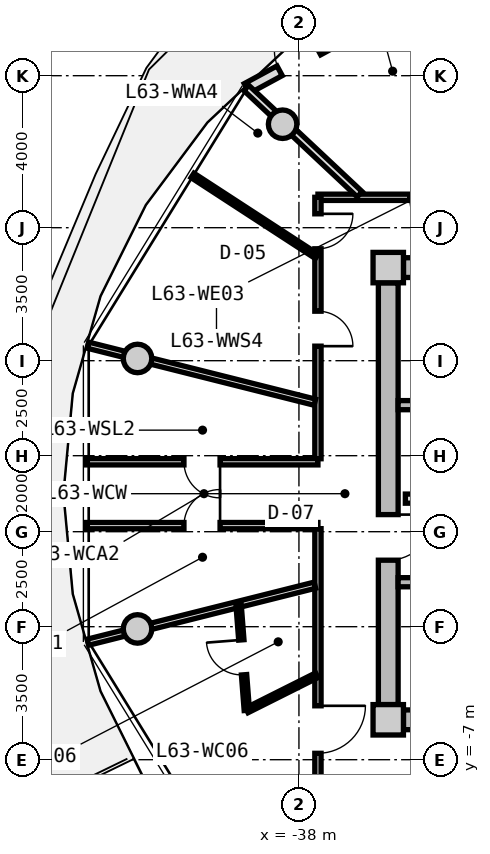
"""IFC4 building model, lengths in metres.
Left out: names, types, materials, properties, quantities, classifications, styles, units other than length and angle.
Written with IfcOpenShell. Run it as: python <this file> out.ifc"""

import sys

from ifc_helpers import new_model, si_unit, direction, frame, frame_2d, origin, origin_2d, place, context, subcontext, project, spatial, rectangle, circle, extrude, source, transform, mapped, element, fill, save


model = new_model("IFC4")
c1 = context("Model", 3, precision=1e-05, world=origin(), true_north=direction((0.0, 1.0)))
c2 = subcontext(c1, "Body", "Model", "MODEL_VIEW")
j1 = project(units=[si_unit("LENGTHUNIT", "METRE"), si_unit("PLANEANGLEUNIT", "RADIAN")], contexts=[c1])
p1 = place(None, origin())
s1 = spatial("IfcSite", under=j1, at=p1, CompositionType="ELEMENT")
p2 = place(p1, origin())
s2 = spatial("IfcBuilding", under=s1, at=p2, CompositionType="ELEMENT")
p3 = place(p2, frame((0.0, 0.0, 203.8)))
s3 = spatial("IfcBuildingStorey", under=s2, at=p3, CompositionType="ELEMENT", Elevation=203.8)
m1 = source(origin(), c2, "Body", "SweptSolid", [
    extrude(rectangle(XDim=0.8, YDim=0.8, at=origin_2d()), origin(), (0.0, 0.0, 1.0), 4.0),
])
for number, where, z_axis, x_axis in (
    (1, (-35.65, -5.95, 0.0), (0.0, 0.0, 1.0), (1.0, 0.0, 0.0)),
    (2, (-35.65, 5.95, 0.0), (0.0, 0.0, 1.0), (1.0, 0.0, 0.0)),
):
    element("IfcColumn", number, at=place(p3, frame(where, z_axis=z_axis, x_axis=x_axis)), inside=s3, PredefinedType="COLUMN", context=c2, shape_type="MappedRepresentation", body=[
        mapped(m1, transform((0.0, 0.0, 0.0), x_axis=(1.0, 0.0, 0.0), y_axis=(0.0, 1.0, 0.0), z_axis=(0.0, 0.0, 1.0), scale=1.0)),
    ])
m2 = source(origin(), c2, "Body", "SweptSolid", [
    extrude(rectangle(XDim=14.5, YDim=0.52, at=frame_2d((7.25, 0.0))), origin(), (0.0, 0.0, 1.0), 3.71),
])
for number, where, z_axis, x_axis in (
    (3, (-35.25, 5.95, 0.0), (0.0, 0.0, 1.0), (1.0, 0.0, 0.0)),
    (4, (-20.75, -5.95, 0.0), (0.0, 0.0, 1.0), (-1.0, 0.0, 0.0)),
):
    element("IfcWall", number, at=place(p3, frame(where, z_axis=z_axis, x_axis=x_axis)), inside=s3, PredefinedType="SHEAR", context=c2, shape_type="MappedRepresentation", body=[
        mapped(m2, transform((0.0, 0.0, 0.0), x_axis=(1.0, 0.0, 0.0), y_axis=(0.0, 1.0, 0.0), z_axis=(0.0, 0.0, 1.0), scale=1.0)),
    ])
m3 = source(origin(), c2, "Body", "SweptSolid", [
    extrude(rectangle(XDim=11.1, YDim=0.52, at=frame_2d((5.55, 0.0))), origin(), (0.0, 0.0, 1.0), 3.71),
])
p4 = place(p3, frame((-35.65, -5.55, 0.0), z_axis=(0.0, 0.0, 1.0), x_axis=(0.0, 1.0, 0.0)))
e5 = element("IfcWall", 5, at=p4, inside=s3, PredefinedType="SHEAR", context=c2, shape_type="MappedRepresentation", body=[
    mapped(m3, transform((0.0, 0.0, 0.0), x_axis=(1.0, 0.0, 0.0), y_axis=(0.0, 1.0, 0.0), z_axis=(0.0, 0.0, 1.0), scale=1.0)),
])
p5 = place(p4, frame((3.8, 0.0, 0.0)))
e6 = element("IfcOpeningElement", 6, at=p5, cuts=e5, PredefinedType="OPENING", context=c2, shape_type="SweptSolid", body=[
    extrude(rectangle(XDim=1.2, YDim=2.15, at=frame_2d((0.6, 1.075))), frame((0.0, 0.27, 0.0), z_axis=(0.0, -1.0, 0.0), x_axis=(1.0, 0.0, 0.0)), (0.0, 0.0, 1.0), 0.54),
])
m4 = source(origin(), c2, "Body", "SweptSolid", [
    extrude(circle(Radius=0.375, at=origin_2d()), origin(), (0.0, 0.0, 1.0), 4.0),
])
for number, where, z_axis, x_axis in (
    (7, (-38.43, 9.723, 0.0), (0.0, 0.0, 1.0), (1.0, 0.0, 0.0)),
    (8, (-42.247, 3.559, 0.0), (0.0, 0.0, 1.0), (1.0, 0.0, 0.0)),
    (9, (-42.247, -3.559, 0.0), (0.0, 0.0, 1.0), (1.0, 0.0, 0.0)),
):
    element("IfcColumn", number, at=place(p3, frame(where, z_axis=z_axis, x_axis=x_axis)), inside=s3, PredefinedType="COLUMN", context=c2, shape_type="MappedRepresentation", body=[
        mapped(m4, transform((0.0, 0.0, 0.0), x_axis=(1.0, 0.0, 0.0), y_axis=(0.0, 1.0, 0.0), z_axis=(0.0, 0.0, 1.0), scale=1.0)),
    ])
m5 = source(origin(), c2, "Body", "SweptSolid", [
    extrude(rectangle(XDim=8.197, YDim=0.29, at=frame_2d((4.099, 0.0))), origin(), (0.0, 0.0, 1.0), 3.71),
])
p6 = place(p3, frame((-39.37, 10.663, 0.0), z_axis=(0.0, 0.0, 1.0), x_axis=(0.879369910001, 0.476139224791, 0.0)))
e10 = element("IfcWall", 10, at=p6, inside=s3, PredefinedType="SOLIDWALL", context=c2, shape_type="MappedRepresentation", body=[
    mapped(m5, transform((0.0, 0.0, 0.0), x_axis=(1.0, 0.0, 0.0), y_axis=(0.0, 1.0, 0.0), z_axis=(0.0, 0.0, 1.0), scale=1.0)),
])
p7 = place(p6, frame((0.98, 0.0, 0.0)))
e11 = element("IfcOpeningElement", 11, at=p7, cuts=e10, PredefinedType="OPENING", context=c2, shape_type="SweptSolid", body=[
    extrude(rectangle(XDim=1.15, YDim=2.25, at=frame_2d((0.575, 1.125))), frame((0.0, 0.155, 0.0), z_axis=(0.0, -1.0, 0.0), x_axis=(1.0, 0.0, 0.0)), (0.0, 0.0, 1.0), 0.31),
])
p8 = place(p6, frame((4.448, 0.0, 0.85)))
e12 = element("IfcOpeningElement", 12, at=p8, cuts=e10, PredefinedType="OPENING", context=c2, shape_type="SweptSolid", body=[
    extrude(rectangle(XDim=1.2, YDim=1.5, at=frame_2d((0.6, 0.75))), frame((0.0, 0.155, 0.0), z_axis=(0.0, -1.0, 0.0), x_axis=(1.0, 0.0, 0.0)), (0.0, 0.0, 1.0), 0.31),
])
m6 = source(origin(), c2, "Body", "SweptSolid", [
    extrude(rectangle(XDim=7.93, YDim=0.24, at=frame_2d((3.965, 0.0))), origin(), (0.0, 0.0, 1.0), 3.71),
])
p9 = place(p3, frame((-35.39, 2.33, 0.0), z_axis=(0.0, 0.0, 1.0), x_axis=(1.0, 0.0, 0.0)))
e13 = element("IfcWall", 13, at=p9, inside=s3, PredefinedType="PARTITIONING", context=c2, shape_type="MappedRepresentation", body=[
    mapped(m6, transform((0.0, 0.0, 0.0), x_axis=(1.0, 0.0, 0.0), y_axis=(0.0, 1.0, 0.0), z_axis=(0.0, 0.0, 1.0), scale=1.0)),
])
p10 = place(p3, frame((-35.39, -2.33, 0.0), z_axis=(0.0, 0.0, 1.0), x_axis=(1.0, 0.0, 0.0)))
e14 = element("IfcWall", 14, at=p10, inside=s3, PredefinedType="PARTITIONING", context=c2, shape_type="MappedRepresentation", body=[
    mapped(m6, transform((0.0, 0.0, 0.0), x_axis=(1.0, 0.0, 0.0), y_axis=(0.0, 1.0, 0.0), z_axis=(0.0, 0.0, 1.0), scale=1.0)),
])
p11 = place(p10, frame((1.05, 0.0, 0.0)))
e15 = element("IfcOpeningElement", 15, at=p11, cuts=e14, PredefinedType="OPENING", context=c2, shape_type="SweptSolid", body=[
    extrude(rectangle(XDim=1.1, YDim=2.15, at=frame_2d((0.55, 1.075))), frame((0.0, 0.13, 0.0), z_axis=(0.0, -1.0, 0.0), x_axis=(1.0, 0.0, 0.0)), (0.0, 0.0, 1.0), 0.26),
])
m7 = source(origin(), c2, "Body", "SweptSolid", [
    extrude(rectangle(XDim=7.62, YDim=0.24, at=frame_2d((3.81, 0.0))), origin(), (0.0, 0.0, 1.0), 3.695),
])
p12 = place(p3, frame((-35.2, -0.13, 0.0), z_axis=(0.0, 0.0, 1.0), x_axis=(1.0, 0.0, 0.0)))
e16 = element("IfcWall", 16, at=p12, inside=s3, PredefinedType="PARTITIONING", context=c2, shape_type="MappedRepresentation", body=[
    mapped(m7, transform((0.0, 0.0, 0.0), x_axis=(1.0, 0.0, 0.0), y_axis=(0.0, 1.0, 0.0), z_axis=(0.0, 0.0, 1.0), scale=1.0)),
])
p13 = place(p12, frame((6.22, 0.0, 0.0)))
e17 = element("IfcOpeningElement", 17, at=p13, cuts=e16, PredefinedType="OPENING", context=c2, shape_type="SweptSolid", body=[
    extrude(rectangle(XDim=1.0, YDim=2.1, at=frame_2d((0.5, 1.05))), frame((0.0, 0.13, 0.0), z_axis=(0.0, -1.0, 0.0), x_axis=(1.0, 0.0, 0.0)), (0.0, 0.0, 1.0), 0.26),
])
p14 = place(p12, frame((2.4, 0.0, 0.0)))
e18 = element("IfcOpeningElement", 18, at=p14, cuts=e16, PredefinedType="OPENING", context=c2, shape_type="SweptSolid", body=[
    extrude(rectangle(XDim=1.0, YDim=2.1, at=frame_2d((0.5, 1.05))), frame((0.0, 0.13, 0.0), z_axis=(0.0, -1.0, 0.0), x_axis=(1.0, 0.0, 0.0)), (0.0, 0.0, 1.0), 0.26),
])
m8 = source(origin(), c2, "Body", "SweptSolid", [
    extrude(rectangle(XDim=8.58, YDim=0.165, at=frame_2d((4.29, 0.0))), origin(), (0.0, 0.0, 1.0), 3.695),
])
p15 = place(p3, frame((-37.5, 7.8, 0.0), z_axis=(0.0, 0.0, 1.0), x_axis=(1.0, 0.0, 0.0)))
e19 = element("IfcWall", 19, at=p15, inside=s3, PredefinedType="PARTITIONING", context=c2, shape_type="MappedRepresentation", body=[
    mapped(m8, transform((0.0, 0.0, 0.0), x_axis=(1.0, 0.0, 0.0), y_axis=(0.0, 1.0, 0.0), z_axis=(0.0, 0.0, 1.0), scale=1.0)),
])
p16 = place(p15, frame((2.415, 0.0, 0.0)))
e20 = element("IfcOpeningElement", 20, at=p16, cuts=e19, PredefinedType="OPENING", context=c2, shape_type="SweptSolid", body=[
    extrude(rectangle(XDim=1.25, YDim=2.2, at=frame_2d((0.625, 1.1))), frame((0.0, 0.093, 0.0), z_axis=(0.0, -1.0, 0.0), x_axis=(1.0, 0.0, 0.0)), (0.0, 0.0, 1.0), 0.185),
])
m9 = source(origin(), c2, "Body", "SweptSolid", [
    extrude(rectangle(XDim=6.88, YDim=0.165, at=frame_2d((3.44, 0.0))), origin(), (0.0, 0.0, 1.0), 3.695),
])
p17 = place(p3, frame((-37.5, -7.8, 0.0), z_axis=(0.0, 0.0, 1.0), x_axis=(0.0, 1.0, 0.0)))
e21 = element("IfcWall", 21, at=p17, inside=s3, PredefinedType="PARTITIONING", context=c2, shape_type="MappedRepresentation", body=[
    mapped(m9, transform((0.0, 0.0, 0.0), x_axis=(1.0, 0.0, 0.0), y_axis=(0.0, 1.0, 0.0), z_axis=(0.0, 0.0, 1.0), scale=1.0)),
])
p18 = place(p17, frame((0.968, 0.0, 0.0)))
e22 = element("IfcOpeningElement", 22, at=p18, cuts=e21, PredefinedType="OPENING", context=c2, shape_type="SweptSolid", body=[
    extrude(rectangle(XDim=1.25, YDim=2.2, at=frame_2d((0.625, 1.1))), frame((0.0, 0.093, 0.0), z_axis=(0.0, -1.0, 0.0), x_axis=(1.0, 0.0, 0.0)), (0.0, 0.0, 1.0), 0.185),
])
p19 = place(p3, frame((-37.5, 0.92, 0.0), z_axis=(0.0, 0.0, 1.0), x_axis=(0.0, 1.0, 0.0)))
e23 = element("IfcWall", 23, at=p19, inside=s3, PredefinedType="PARTITIONING", context=c2, shape_type="MappedRepresentation", body=[
    mapped(m9, transform((0.0, 0.0, 0.0), x_axis=(1.0, 0.0, 0.0), y_axis=(0.0, 1.0, 0.0), z_axis=(0.0, 0.0, 1.0), scale=1.0)),
])
p20 = place(p19, frame((5.525, 0.0, 0.0)))
e24 = element("IfcOpeningElement", 24, at=p20, cuts=e23, PredefinedType="OPENING", context=c2, shape_type="SweptSolid", body=[
    extrude(rectangle(XDim=0.92, YDim=2.1, at=frame_2d((0.46, 1.05))), frame((0.0, 0.093, 0.0), z_axis=(0.0, -1.0, 0.0), x_axis=(1.0, 0.0, 0.0)), (0.0, 0.0, 1.0), 0.185),
])
p21 = place(p19, frame((2.962, 0.0, 0.0)))
e25 = element("IfcOpeningElement", 25, at=p21, cuts=e23, PredefinedType="OPENING", context=c2, shape_type="SweptSolid", body=[
    extrude(rectangle(XDim=0.92, YDim=2.1, at=frame_2d((0.46, 1.05))), frame((0.0, 0.093, 0.0), z_axis=(0.0, -1.0, 0.0), x_axis=(1.0, 0.0, 0.0)), (0.0, 0.0, 1.0), 0.185),
])
m10 = source(origin(), c2, "Body", "SweptSolid", [
    extrude(rectangle(XDim=6.157, YDim=0.165, at=frame_2d((3.079, 0.0))), origin(), (0.0, 0.0, 1.0), 3.295),
])
for number, where, z_axis, x_axis in (
    (26, (-37.58, 2.407, 0.0), (0.0, 0.0, 1.0), (-0.97, 0.244, 0.0)),
    (27, (-37.58, -2.407, 0.0), (0.0, 0.0, 1.0), (-0.97, -0.244, 0.0)),
):
    element("IfcWall", number, at=place(p3, frame(where, z_axis=z_axis, x_axis=x_axis)), inside=s3, PredefinedType="PARTITIONING", context=c2, shape_type="MappedRepresentation", body=[
        mapped(m10, transform((0.0, 0.0, 0.0), x_axis=(1.0, 0.0, 0.0), y_axis=(0.0, 1.0, 0.0), z_axis=(0.0, 0.0, 1.0), scale=1.0)),
    ])
m11 = source(origin(), c2, "Body", "SweptSolid", [
    extrude(rectangle(XDim=6.101, YDim=0.165, at=frame_2d((3.051, 0.0))), origin(), (0.0, 0.0, 1.0), 3.695),
])
p22 = place(p3, frame((-43.601, 0.84, 0.0), z_axis=(0.0, 0.0, 1.0), x_axis=(1.0, 0.0, 0.0)))
e28 = element("IfcWall", 28, at=p22, inside=s3, PredefinedType="PARTITIONING", context=c2, shape_type="MappedRepresentation", body=[
    mapped(m11, transform((0.0, 0.0, 0.0), x_axis=(1.0, 0.0, 0.0), y_axis=(0.0, 1.0, 0.0), z_axis=(0.0, 0.0, 1.0), scale=1.0)),
])
p23 = place(p22, frame((2.576, 0.0, 0.0)))
e29 = element("IfcOpeningElement", 29, at=p23, cuts=e28, PredefinedType="OPENING", context=c2, shape_type="SweptSolid", body=[
    extrude(rectangle(XDim=0.95, YDim=2.1, at=frame_2d((0.475, 1.05))), frame((0.0, 0.093, 0.0), z_axis=(0.0, -1.0, 0.0), x_axis=(1.0, 0.0, 0.0)), (0.0, 0.0, 1.0), 0.185),
])
p24 = place(p3, frame((-37.5, -0.84, 0.0), z_axis=(0.0, 0.0, 1.0), x_axis=(-1.0, 0.0, 0.0)))
e30 = element("IfcWall", 30, at=p24, inside=s3, PredefinedType="PARTITIONING", context=c2, shape_type="MappedRepresentation", body=[
    mapped(m11, transform((0.0, 0.0, 0.0), x_axis=(1.0, 0.0, 0.0), y_axis=(0.0, 1.0, 0.0), z_axis=(0.0, 0.0, 1.0), scale=1.0)),
])
p25 = place(p24, frame((2.576, 0.0, 0.0)))
e31 = element("IfcOpeningElement", 31, at=p25, cuts=e30, PredefinedType="OPENING", context=c2, shape_type="SweptSolid", body=[
    extrude(rectangle(XDim=0.95, YDim=2.1, at=frame_2d((0.475, 1.05))), frame((0.0, 0.093, 0.0), z_axis=(0.0, -1.0, 0.0), x_axis=(1.0, 0.0, 0.0)), (0.0, 0.0, 1.0), 0.185),
])
m12 = source(origin(), c2, "Body", "SweptSolid", [
    extrude(rectangle(XDim=4.089, YDim=0.19, at=frame_2d((2.044, 0.0))), origin(), (0.0, 0.0, 1.0), 3.295),
])
p26 = place(p3, frame((-36.402, 7.88, 0.0), z_axis=(0.0, 0.0, 1.0), x_axis=(-0.729401273609, 0.684086092577, 0.0)))
e32 = element("IfcWall", 32, at=p26, inside=s3, PredefinedType="PARTITIONING", context=c2, shape_type="MappedRepresentation", body=[
    mapped(m12, transform((0.0, 0.0, 0.0), x_axis=(1.0, 0.0, 0.0), y_axis=(0.0, 1.0, 0.0), z_axis=(0.0, 0.0, 1.0), scale=1.0)),
])
m13 = source(origin(), c2, "Body", "SweptSolid", [
    extrude(rectangle(XDim=3.904, YDim=0.14, at=frame_2d((1.952, 0.0))), origin(), (0.0, 0.0, 1.0), 3.695),
])
p27 = place(p3, frame((-37.53, 6.246, 0.0), z_axis=(0.0, 0.0, 1.0), x_axis=(-0.838024687996, 0.545632314209, 0.0)))
e33 = element("IfcWall", 33, at=p27, inside=s3, PredefinedType="PARTITIONING", context=c2, shape_type="MappedRepresentation", body=[
    mapped(m13, transform((0.0, 0.0, 0.0), x_axis=(1.0, 0.0, 0.0), y_axis=(0.0, 1.0, 0.0), z_axis=(0.0, 0.0, 1.0), scale=1.0)),
])
m14 = source(origin(), c2, "Body", "SweptSolid", [
    extrude(rectangle(XDim=2.06, YDim=0.14, at=frame_2d((1.03, 0.0))), origin(), (0.0, 0.0, 1.0), 3.695),
])
p28 = place(p3, frame((-37.53, -4.778, 0.0), z_axis=(0.0, 0.0, 1.0), x_axis=(-0.893952568722, -0.448161583444, 0.0)))
e34 = element("IfcWall", 34, at=p28, inside=s3, PredefinedType="PARTITIONING", context=c2, shape_type="MappedRepresentation", body=[
    mapped(m14, transform((0.0, 0.0, 0.0), x_axis=(1.0, 0.0, 0.0), y_axis=(0.0, 1.0, 0.0), z_axis=(0.0, 0.0, 1.0), scale=1.0)),
])
m15 = source(origin(), c2, "Body", "SweptSolid", [
    extrude(rectangle(XDim=2.798, YDim=0.14, at=frame_2d((1.399, 0.0))), origin(), (0.0, 0.0, 1.0), 3.695),
])
p29 = place(p3, frame((-39.371, -5.701, 0.0), z_axis=(0.0, 0.0, 1.0), x_axis=(-0.077823984089, 0.996967114553, 0.0)))
e35 = element("IfcWall", 35, at=p29, inside=s3, PredefinedType="PARTITIONING", context=c2, shape_type="MappedRepresentation", body=[
    mapped(m15, transform((0.0, 0.0, 0.0), x_axis=(1.0, 0.0, 0.0), y_axis=(0.0, 1.0, 0.0), z_axis=(0.0, 0.0, 1.0), scale=1.0)),
])
p30 = place(p29, frame((0.939, 0.0, 0.0)))
e36 = element("IfcOpeningElement", 36, at=p30, cuts=e35, PredefinedType="OPENING", context=c2, shape_type="SweptSolid", body=[
    extrude(rectangle(XDim=0.92, YDim=2.1, at=frame_2d((0.46, 1.05))), frame((0.0, 0.08, 0.0), z_axis=(0.0, -1.0, 0.0), x_axis=(1.0, 0.0, 0.0)), (0.0, 0.0, 1.0), 0.16),
])
m16 = source(origin(), c2, "Body", "SweptSolid", [
    extrude(rectangle(XDim=1.15, YDim=2.25, at=frame_2d((0.575, 1.125))), frame((0.0, 0.025, 0.0), z_axis=(0.0, -1.0, 0.0), x_axis=(1.0, 0.0, 0.0)), (0.0, 0.0, 1.0), 0.05),
])
p31 = place(p7, origin())
e37 = element("IfcDoor", 37, at=p31, inside=s3, OperationType="SINGLE_SWING_RIGHT", PredefinedType="DOOR", context=c2, shape_type="MappedRepresentation", body=[
    mapped(m16, transform((0.0, 0.0, 0.0), x_axis=(1.0, 0.0, 0.0), y_axis=(0.0, 1.0, 0.0), z_axis=(0.0, 0.0, 1.0), scale=1.0)),
])
fill(e11, e37)
m17 = source(origin(), c2, "Body", "SweptSolid", [
    extrude(rectangle(XDim=1.2, YDim=2.15, at=frame_2d((0.6, 1.075))), frame((0.0, 0.025, 0.0), z_axis=(0.0, -1.0, 0.0), x_axis=(1.0, 0.0, 0.0)), (0.0, 0.0, 1.0), 0.05),
])
p32 = place(p5, frame((1.2, 0.0, 0.0), z_axis=(0.0, 0.0, 1.0), x_axis=(-1.0, 0.0, 0.0)))
e38 = element("IfcDoor", 38, at=p32, inside=s3, OperationType="SINGLE_SWING_LEFT", PredefinedType="DOOR", context=c2, shape_type="MappedRepresentation", body=[
    mapped(m17, transform((0.0, 0.0, 0.0), x_axis=(1.0, 0.0, 0.0), y_axis=(0.0, 1.0, 0.0), z_axis=(0.0, 0.0, 1.0), scale=1.0)),
])
fill(e6, e38)
m18 = source(origin(), c2, "Body", "SweptSolid", [
    extrude(rectangle(XDim=0.95, YDim=2.1, at=frame_2d((0.475, 1.05))), frame((0.0, 0.025, 0.0), z_axis=(0.0, -1.0, 0.0), x_axis=(1.0, 0.0, 0.0)), (0.0, 0.0, 1.0), 0.05),
])
p33 = place(p25, frame((0.95, 0.0, 0.0), z_axis=(0.0, 0.0, 1.0), x_axis=(-1.0, 0.0, 0.0)))
e39 = element("IfcDoor", 39, at=p33, inside=s3, OperationType="SINGLE_SWING_RIGHT", PredefinedType="DOOR", context=c2, shape_type="MappedRepresentation", body=[
    mapped(m18, transform((0.0, 0.0, 0.0), x_axis=(1.0, 0.0, 0.0), y_axis=(0.0, 1.0, 0.0), z_axis=(0.0, 0.0, 1.0), scale=1.0)),
])
fill(e31, e39)
p34 = place(p23, frame((0.95, 0.0, 0.0), z_axis=(0.0, 0.0, 1.0), x_axis=(-1.0, 0.0, 0.0)))
e40 = element("IfcDoor", 40, at=p34, inside=s3, OperationType="SINGLE_SWING_LEFT", PredefinedType="DOOR", context=c2, shape_type="MappedRepresentation", body=[
    mapped(m18, transform((0.0, 0.0, 0.0), x_axis=(1.0, 0.0, 0.0), y_axis=(0.0, 1.0, 0.0), z_axis=(0.0, 0.0, 1.0), scale=1.0)),
])
fill(e29, e40)
m19 = source(origin(), c2, "Body", "SweptSolid", [
    extrude(rectangle(XDim=1.25, YDim=2.2, at=frame_2d((0.625, 1.1))), frame((0.0, 0.025, 0.0), z_axis=(0.0, -1.0, 0.0), x_axis=(1.0, 0.0, 0.0)), (0.0, 0.0, 1.0), 0.05),
])
p35 = place(p16, frame((1.25, 0.0, 0.0), z_axis=(0.0, 0.0, 1.0), x_axis=(-1.0, 0.0, 0.0)))
e41 = element("IfcDoor", 41, at=p35, inside=s3, OperationType="SINGLE_SWING_LEFT", PredefinedType="DOOR", context=c2, shape_type="MappedRepresentation", body=[
    mapped(m19, transform((0.0, 0.0, 0.0), x_axis=(1.0, 0.0, 0.0), y_axis=(0.0, 1.0, 0.0), z_axis=(0.0, 0.0, 1.0), scale=1.0)),
])
fill(e20, e41)
m20 = source(origin(), c2, "Body", "SweptSolid", [
    extrude(rectangle(XDim=0.92, YDim=2.1, at=frame_2d((0.46, 1.05))), frame((0.0, 0.025, 0.0), z_axis=(0.0, -1.0, 0.0), x_axis=(1.0, 0.0, 0.0)), (0.0, 0.0, 1.0), 0.05),
])
p36 = place(p20, frame((0.92, 0.0, 0.0), z_axis=(0.0, 0.0, 1.0), x_axis=(-1.0, 0.0, 0.0)))
e42 = element("IfcDoor", 42, at=p36, inside=s3, OperationType="SINGLE_SWING_LEFT", PredefinedType="DOOR", context=c2, shape_type="MappedRepresentation", body=[
    mapped(m20, transform((0.0, 0.0, 0.0), x_axis=(1.0, 0.0, 0.0), y_axis=(0.0, 1.0, 0.0), z_axis=(0.0, 0.0, 1.0), scale=1.0)),
])
fill(e24, e42)
p37 = place(p21, frame((0.92, 0.0, 0.0), z_axis=(0.0, 0.0, 1.0), x_axis=(-1.0, 0.0, 0.0)))
e43 = element("IfcDoor", 43, at=p37, inside=s3, OperationType="SINGLE_SWING_RIGHT", PredefinedType="DOOR", context=c2, shape_type="MappedRepresentation", body=[
    mapped(m20, transform((0.0, 0.0, 0.0), x_axis=(1.0, 0.0, 0.0), y_axis=(0.0, 1.0, 0.0), z_axis=(0.0, 0.0, 1.0), scale=1.0)),
])
fill(e25, e43)
p38 = place(p18, frame((1.25, 0.0, 0.0), z_axis=(0.0, 0.0, 1.0), x_axis=(-1.0, 0.0, 0.0)))
e44 = element("IfcDoor", 44, at=p38, inside=s3, OperationType="SINGLE_SWING_LEFT", PredefinedType="DOOR", context=c2, shape_type="MappedRepresentation", body=[
    mapped(m19, transform((0.0, 0.0, 0.0), x_axis=(1.0, 0.0, 0.0), y_axis=(0.0, 1.0, 0.0), z_axis=(0.0, 0.0, 1.0), scale=1.0)),
])
fill(e22, e44)
p39 = place(p30, origin())
e45 = element("IfcDoor", 45, at=p39, inside=s3, OperationType="SINGLE_SWING_RIGHT", PredefinedType="DOOR", context=c2, shape_type="MappedRepresentation", body=[
    mapped(m20, transform((0.0, 0.0, 0.0), x_axis=(1.0, 0.0, 0.0), y_axis=(0.0, 1.0, 0.0), z_axis=(0.0, 0.0, 1.0), scale=1.0)),
])
fill(e36, e45)
save(model, sys.argv[1])
